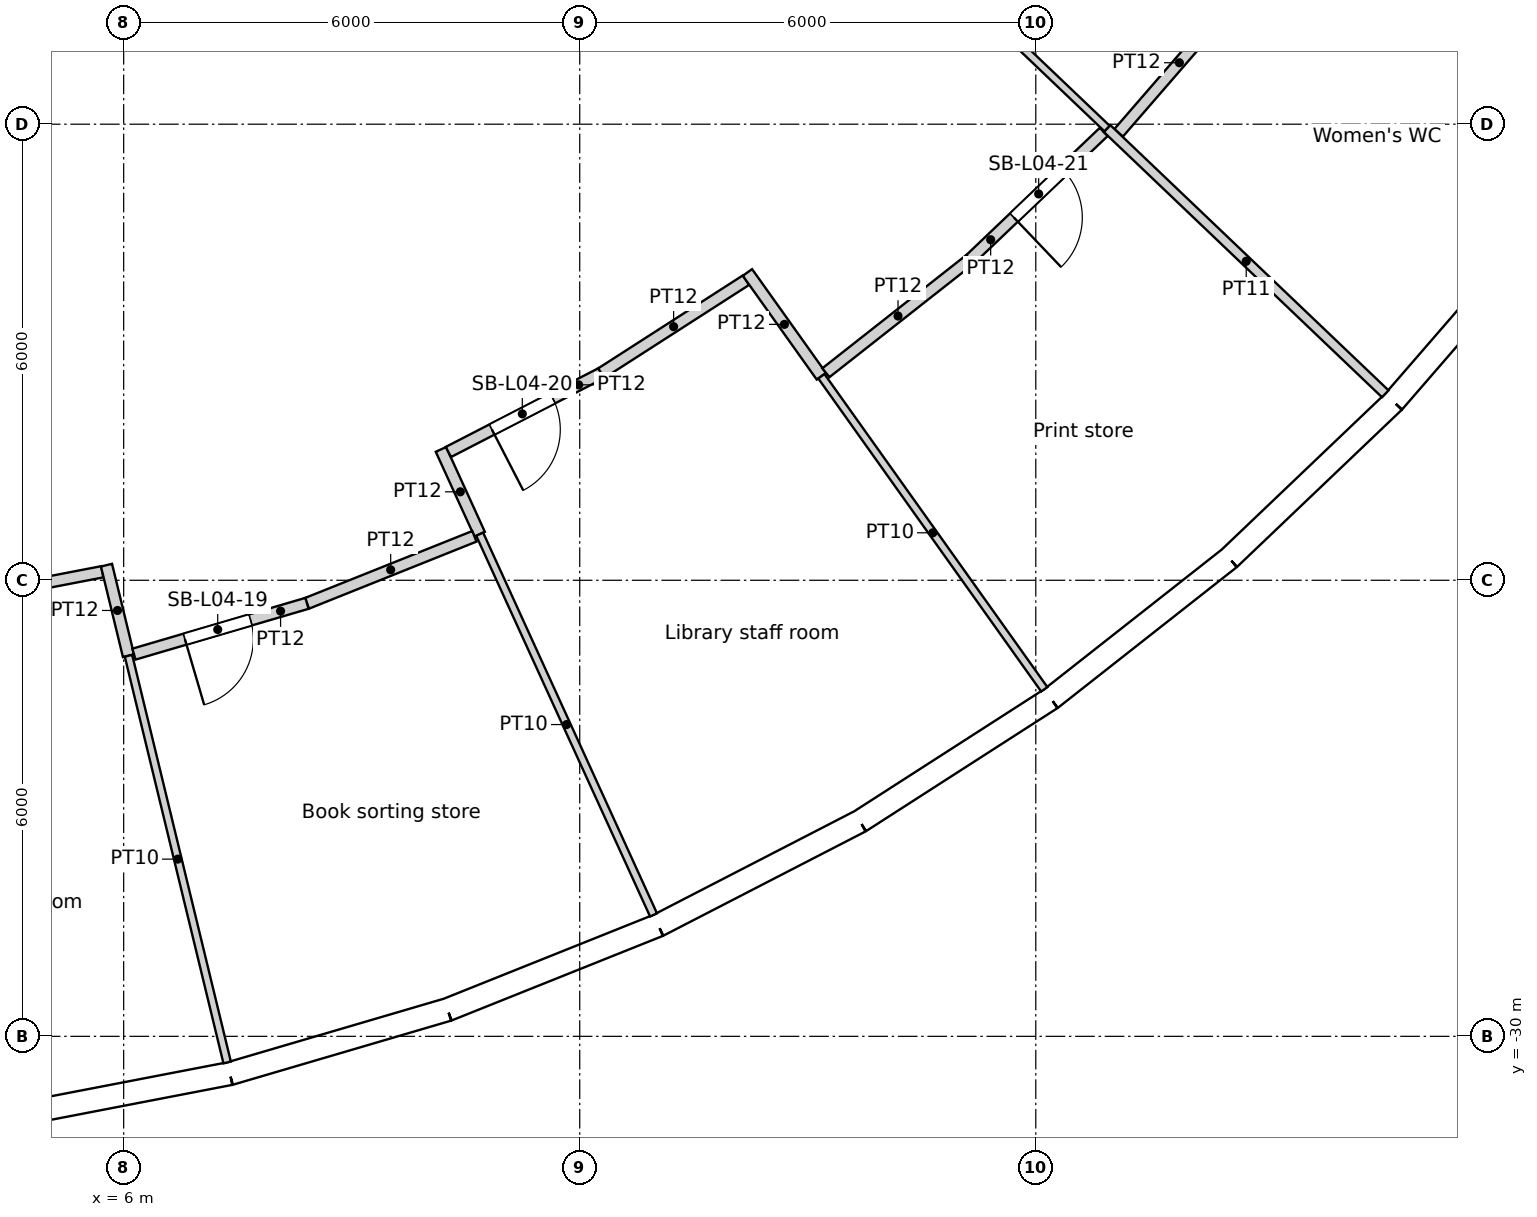
"""IFC4 building model, lengths in metres.
Left out: names, types, materials, properties, quantities, classifications, styles, units other than length and angle.
Written with IfcOpenShell. Run it as: python <this file> out.ifc"""

import sys

from ifc_helpers import new_model, si_unit, direction, frame, frame_2d, origin, origin_2d, place, context, subcontext, project, spatial, rectangle, circle, extrude, element, fill, save


model = new_model("IFC4")
c1 = context("Model", 3, precision=1e-05, world=origin(), true_north=direction((0.0, 1.0)))
c2 = subcontext(c1, "Body", "Model", "MODEL_VIEW")
j1 = project(units=[si_unit("LENGTHUNIT", "METRE"), si_unit("PLANEANGLEUNIT", "RADIAN")], contexts=[c1])
p1 = place(None, origin())
s1 = spatial("IfcSite", under=j1, at=p1, CompositionType="ELEMENT")
p2 = place(p1, origin())
s2 = spatial("IfcBuilding", under=s1, at=p2, CompositionType="ELEMENT")
p3 = place(p2, frame((0.0, 0.0, 23.4)))
s3 = spatial("IfcBuildingStorey", under=s2, at=p3, CompositionType="ELEMENT", Elevation=23.4)
for number, where, z_axis, x_axis in (
    (1, (7.137, -29.421, 0.0), (0.0, 0.0, 1.0), (1.0, 0.0, 0.0)),
    (2, (12.576, -27.539, 0.0), (0.0, 0.0, 1.0), (1.0, 0.0, 0.0)),
    (3, (17.561, -24.661, 0.0), (0.0, 0.0, 1.0), (1.0, 0.0, 0.0)),
    (4, (21.911, -20.892, 0.0), (0.0, 0.0, 1.0), (1.0, 0.0, 0.0)),
):
    element("IfcColumn", number, at=place(p3, frame(where, z_axis=z_axis, x_axis=x_axis)), inside=s3, PredefinedType="COLUMN", context=c2, shape_type="SweptSolid", body=[
        extrude(circle(Radius=0.7, at=origin_2d()), origin(), (0.0, 0.0, 1.0), 4.8),
    ])
for number, where, z_axis, x_axis in (
    (5, (9.723, -22.54, 0.0), (0.0, 0.0, 1.0), (1.0, 0.0, 0.0)),
    (6, (14.659, -19.69, 0.0), (0.0, 0.0, 1.0), (1.0, 0.0, 0.0)),
):
    element("IfcColumn", number, at=place(p3, frame(where, z_axis=z_axis, x_axis=x_axis)), inside=s3, PredefinedType="COLUMN", context=c2, shape_type="SweptSolid", body=[
        extrude(circle(Radius=0.75, at=origin_2d()), origin(), (0.0, 0.0, 1.0), 4.8),
    ])
p4 = place(p3, frame((6.876, -17.521, 0.0), z_axis=(0.0, 0.0, 1.0), x_axis=(1.0, 0.0, 0.0)))
e7 = element("IfcColumn", 7, at=p4, inside=s3, PredefinedType="COLUMN", context=c2, shape_type="SweptSolid", body=[
    extrude(circle(Radius=0.8, at=origin_2d()), origin(), (0.0, 0.0, 1.0), 4.8),
])
p5 = place(p3, frame((4.465, -31.055, 0.0), z_axis=(0.0, 0.0, 1.0), x_axis=(0.981918853666, 0.189302310646, 0.0)))
e8 = element("IfcWall", 8, at=p5, inside=s3, PredefinedType="SOLIDWALL", context=c2, shape_type="SweptSolid", body=[
    extrude(rectangle(XDim=2.986, YDim=0.3, at=frame_2d((1.493, 0.0))), origin(), (0.0, 0.0, 1.0), 3.85),
])
p6 = place(p5, frame((1.493, 0.0, 2.0)))
e9 = element("IfcOpeningElement", 9, at=p6, cuts=e8, PredefinedType="OPENING", context=c2, shape_type="SweptSolid", body=[
    extrude(circle(Radius=1.2, at=origin_2d()), frame((0.0, 0.16, 0.0), z_axis=(0.0, -1.0, 0.0), x_axis=(1.0, 0.0, 0.0)), (0.0, 0.0, 1.0), 0.32),
])
p7 = place(p3, frame((7.397, -30.49, 0.0), z_axis=(0.0, 0.0, 1.0), x_axis=(0.959502108153, 0.281701445593, 0.0)))
e10 = element("IfcWall", 10, at=p7, inside=s3, PredefinedType="SOLIDWALL", context=c2, shape_type="SweptSolid", body=[
    extrude(rectangle(XDim=2.986, YDim=0.3, at=frame_2d((1.493, 0.0))), origin(), (0.0, 0.0, 1.0), 4.35),
])
p8 = place(p7, frame((1.493, 0.0, 2.0)))
e11 = element("IfcOpeningElement", 11, at=p8, cuts=e10, PredefinedType="OPENING", context=c2, shape_type="SweptSolid", body=[
    extrude(circle(Radius=1.2, at=origin_2d()), frame((0.0, 0.16, 0.0), z_axis=(0.0, -1.0, 0.0), x_axis=(1.0, 0.0, 0.0)), (0.0, 0.0, 1.0), 0.32),
])
p9 = place(p3, frame((10.261, -29.649, 0.0), z_axis=(0.0, 0.0, 1.0), x_axis=(0.928380795373, 0.371630325434, 0.0)))
e12 = element("IfcWall", 12, at=p9, inside=s3, PredefinedType="SOLIDWALL", context=c2, shape_type="SweptSolid", body=[
    extrude(rectangle(XDim=2.986, YDim=0.3, at=frame_2d((1.493, 0.0))), origin(), (0.0, 0.0, 1.0), 4.35),
])
p10 = place(p9, frame((1.493, 0.0, 2.0)))
e13 = element("IfcOpeningElement", 13, at=p10, cuts=e12, PredefinedType="OPENING", context=c2, shape_type="SweptSolid", body=[
    extrude(circle(Radius=1.2, at=origin_2d()), frame((0.0, 0.16, 0.0), z_axis=(0.0, -1.0, 0.0), x_axis=(1.0, 0.0, 0.0)), (0.0, 0.0, 1.0), 0.32),
])
p11 = place(p3, frame((13.033, -28.539, 0.0), z_axis=(0.0, 0.0, 1.0), x_axis=(0.888831268481, 0.458234630043, 0.0)))
e14 = element("IfcWall", 14, at=p11, inside=s3, PredefinedType="SOLIDWALL", context=c2, shape_type="SweptSolid", body=[
    extrude(rectangle(XDim=2.986, YDim=0.3, at=frame_2d((1.493, 0.0))), origin(), (0.0, 0.0, 1.0), 3.85),
])
p12 = place(p11, frame((1.493, 0.0, 2.0)))
e15 = element("IfcOpeningElement", 15, at=p12, cuts=e14, PredefinedType="OPENING", context=c2, shape_type="SweptSolid", body=[
    extrude(circle(Radius=1.2, at=origin_2d()), frame((0.0, 0.16, 0.0), z_axis=(0.0, -1.0, 0.0), x_axis=(1.0, 0.0, 0.0)), (0.0, 0.0, 1.0), 0.32),
])
p13 = place(p3, frame((15.687, -27.171, 0.0), z_axis=(0.0, 0.0, 1.0), x_axis=(0.841242231846, 0.540658401727, 0.0)))
e16 = element("IfcWall", 16, at=p13, inside=s3, PredefinedType="SOLIDWALL", context=c2, shape_type="SweptSolid", body=[
    extrude(rectangle(XDim=2.986, YDim=0.3, at=frame_2d((1.493, 0.0))), origin(), (0.0, 0.0, 1.0), 4.35),
])
p14 = place(p13, frame((1.493, 0.0, 2.0)))
e17 = element("IfcOpeningElement", 17, at=p14, cuts=e16, PredefinedType="OPENING", context=c2, shape_type="SweptSolid", body=[
    extrude(circle(Radius=1.2, at=origin_2d()), frame((0.0, 0.16, 0.0), z_axis=(0.0, -1.0, 0.0), x_axis=(1.0, 0.0, 0.0)), (0.0, 0.0, 1.0), 0.32),
])
p15 = place(p3, frame((18.199, -25.557, 0.0), z_axis=(0.0, 0.0, 1.0), x_axis=(0.786043032847, 0.618171780747, 0.0)))
e18 = element("IfcWall", 18, at=p15, inside=s3, PredefinedType="SOLIDWALL", context=c2, shape_type="SweptSolid", body=[
    extrude(rectangle(XDim=2.986, YDim=0.3, at=frame_2d((1.493, 0.0))), origin(), (0.0, 0.0, 1.0), 4.35),
])
p16 = place(p15, frame((1.493, 0.0, 2.0)))
e19 = element("IfcOpeningElement", 19, at=p16, cuts=e18, PredefinedType="OPENING", context=c2, shape_type="SweptSolid", body=[
    extrude(circle(Radius=1.2, at=origin_2d()), frame((0.0, 0.16, 0.0), z_axis=(0.0, -1.0, 0.0), x_axis=(1.0, 0.0, 0.0)), (0.0, 0.0, 1.0), 0.32),
])
p17 = place(p3, frame((20.546, -23.711, 0.0), z_axis=(0.0, 0.0, 1.0), x_axis=(0.723750841228, 0.690061388444, 0.0)))
e20 = element("IfcWall", 20, at=p17, inside=s3, PredefinedType="SOLIDWALL", context=c2, shape_type="SweptSolid", body=[
    extrude(rectangle(XDim=2.986, YDim=0.3, at=frame_2d((1.493, 0.0))), origin(), (0.0, 0.0, 1.0), 3.85),
])
p18 = place(p17, frame((1.493, 0.0, 2.0)))
e21 = element("IfcOpeningElement", 21, at=p18, cuts=e20, PredefinedType="OPENING", context=c2, shape_type="SweptSolid", body=[
    extrude(circle(Radius=1.2, at=origin_2d()), frame((0.0, 0.16, 0.0), z_axis=(0.0, -1.0, 0.0), x_axis=(1.0, 0.0, 0.0)), (0.0, 0.0, 1.0), 0.32),
])
p19 = place(p3, frame((22.707, -21.651, 0.0), z_axis=(0.0, 0.0, 1.0), x_axis=(0.654809121128, 0.755794294029, 0.0)))
e22 = element("IfcWall", 22, at=p19, inside=s3, PredefinedType="SOLIDWALL", context=c2, shape_type="SweptSolid", body=[
    extrude(rectangle(XDim=2.986, YDim=0.3, at=frame_2d((1.493, 0.0))), origin(), (0.0, 0.0, 1.0), 4.35),
])
p20 = place(p19, frame((1.493, 0.0, 2.0)))
e23 = element("IfcOpeningElement", 23, at=p20, cuts=e22, PredefinedType="OPENING", context=c2, shape_type="SweptSolid", body=[
    extrude(circle(Radius=1.2, at=origin_2d()), frame((0.0, 0.16, 0.0), z_axis=(0.0, -1.0, 0.0), x_axis=(1.0, 0.0, 0.0)), (0.0, 0.0, 1.0), 0.32),
])
p21 = place(p3, frame((3.496, -24.317, 0.0), z_axis=(0.0, 0.0, 1.0), x_axis=(0.981934043808, 0.18922350174, 0.0)))
e24 = element("IfcWall", 24, at=p21, inside=s3, PredefinedType="PARTITIONING", context=c2, shape_type="SweptSolid", body=[
    extrude(rectangle(XDim=2.263, YDim=0.15, at=frame_2d((1.131, 0.0))), origin(), (0.0, 0.0, 1.0), 3.75),
])
p22 = place(p3, frame((6.063, -24.993, 0.0), z_axis=(0.0, 0.0, 1.0), x_axis=(-0.235691182892, 0.97182800243, 0.0)))
e25 = element("IfcWall", 25, at=p22, inside=s3, PredefinedType="PARTITIONING", context=c2, shape_type="SweptSolid", body=[
    extrude(rectangle(XDim=1.227, YDim=0.15, at=frame_2d((0.613, 0.0))), origin(), (0.0, 0.0, 1.0), 3.75),
])
p23 = place(p3, frame((8.412, -24.304, 0.0), z_axis=(0.0, 0.0, 1.0), x_axis=(-0.959514485928, -0.281659282281, 0.0)))
e26 = element("IfcWall", 26, at=p23, inside=s3, PredefinedType="PARTITIONING", context=c2, shape_type="SweptSolid", body=[
    extrude(rectangle(XDim=2.372, YDim=0.15, at=frame_2d((1.186, 0.0))), origin(), (0.0, 0.0, 1.0), 3.75),
])
p24 = place(p23, frame((0.774, 0.0, 0.0)))
e27 = element("IfcOpeningElement", 27, at=p24, cuts=e26, PredefinedType="OPENING", context=c2, shape_type="SweptSolid", body=[
    extrude(rectangle(XDim=0.9, YDim=2.1, at=frame_2d((0.45, 1.05))), frame((0.0, 0.075, 0.0), z_axis=(0.0, -1.0, 0.0), x_axis=(1.0, 0.0, 0.0)), (0.0, 0.0, 1.0), 0.15),
])
p25 = place(p3, frame((7.361, -30.344, 0.0), z_axis=(0.0, 0.0, 1.0), x_axis=(-0.235758656248, 0.971811636072, 0.0)))
e28 = element("IfcWall", 28, at=p25, inside=s3, PredefinedType="PARTITIONING", context=c2, shape_type="SweptSolid", body=[
    extrude(rectangle(XDim=5.506, YDim=0.1, at=frame_2d((2.753, 0.0))), origin(), (0.0, 0.0, 1.0), 3.75),
])
p26 = place(p3, frame((8.412, -24.304, 0.0), z_axis=(0.0, 0.0, 1.0), x_axis=(0.928348885918, 0.371710029479, 0.0)))
e29 = element("IfcWall", 29, at=p26, inside=s3, PredefinedType="PARTITIONING", context=c2, shape_type="SweptSolid", body=[
    extrude(rectangle(XDim=2.372, YDim=0.15, at=frame_2d((1.186, 0.0))), origin(), (0.0, 0.0, 1.0), 3.75),
])
p27 = place(p3, frame((12.283, -21.275, 0.0), z_axis=(0.0, 0.0, 1.0), x_axis=(-0.888834753306, -0.458227870514, 0.0)))
e30 = element("IfcWall", 30, at=p27, inside=s3, PredefinedType="PARTITIONING", context=c2, shape_type="SweptSolid", body=[
    extrude(rectangle(XDim=2.263, YDim=0.15, at=frame_2d((1.131, 0.0))), origin(), (0.0, 0.0, 1.0), 3.75),
])
p28 = place(p27, frame((0.719, 0.0, 0.0)))
e31 = element("IfcOpeningElement", 31, at=p28, cuts=e30, PredefinedType="OPENING", context=c2, shape_type="SweptSolid", body=[
    extrude(rectangle(XDim=0.9, YDim=2.1, at=frame_2d((0.45, 1.05))), frame((0.0, 0.075, 0.0), z_axis=(0.0, -1.0, 0.0), x_axis=(1.0, 0.0, 0.0)), (0.0, 0.0, 1.0), 0.15),
])
p29 = place(p3, frame((10.684, -23.394, 0.0), z_axis=(0.0, 0.0, 1.0), x_axis=(-0.415392653696, 0.909642206175, 0.0)))
e32 = element("IfcWall", 32, at=p29, inside=s3, PredefinedType="PARTITIONING", context=c2, shape_type="SweptSolid", body=[
    extrude(rectangle(XDim=1.226, YDim=0.15, at=frame_2d((0.613, 0.0))), origin(), (0.0, 0.0, 1.0), 3.75),
])
p30 = place(p3, frame((12.283, -21.275, 0.0), z_axis=(0.0, 0.0, 1.0), x_axis=(0.841245074687, 0.540653978358, 0.0)))
e33 = element("IfcWall", 33, at=p30, inside=s3, PredefinedType="PARTITIONING", context=c2, shape_type="SweptSolid", body=[
    extrude(rectangle(XDim=2.263, YDim=0.15, at=frame_2d((1.131, 0.0))), origin(), (0.0, 0.0, 1.0), 3.75),
])
p31 = place(p3, frame((12.971, -28.403, 0.0), z_axis=(0.0, 0.0, 1.0), x_axis=(-0.415402419846, 0.909637746351, 0.0)))
e34 = element("IfcWall", 34, at=p31, inside=s3, PredefinedType="PARTITIONING", context=c2, shape_type="SweptSolid", body=[
    extrude(rectangle(XDim=5.506, YDim=0.1, at=frame_2d((2.753, 0.0))), origin(), (0.0, 0.0, 1.0), 3.75),
])
p32 = place(p3, frame((15.179, -21.316, 0.0), z_axis=(0.0, 0.0, 1.0), x_axis=(-0.580039379053, 0.814588435191, 0.0)))
e35 = element("IfcWall", 35, at=p32, inside=s3, PredefinedType="PARTITIONING", context=c2, shape_type="SweptSolid", body=[
    extrude(rectangle(XDim=1.677, YDim=0.15, at=frame_2d((0.838, 0.0))), origin(), (0.0, 0.0, 1.0), 3.75),
])
p33 = place(p3, frame((15.238, -21.27, 0.0), z_axis=(0.0, 0.0, 1.0), x_axis=(0.786009575481, 0.618214321456, 0.0)))
e36 = element("IfcWall", 36, at=p33, inside=s3, PredefinedType="PARTITIONING", context=c2, shape_type="SweptSolid", body=[
    extrude(rectangle(XDim=2.415, YDim=0.15, at=frame_2d((1.208, 0.0))), origin(), (0.0, 0.0, 1.0), 3.75),
])
p34 = place(p3, frame((18.894, -18.102, 0.0), z_axis=(0.0, 0.0, 1.0), x_axis=(-0.723750392948, -0.690061858609, 0.0)))
e37 = element("IfcWall", 37, at=p34, inside=s3, PredefinedType="PARTITIONING", context=c2, shape_type="SweptSolid", body=[
    extrude(rectangle(XDim=2.428, YDim=0.15, at=frame_2d((1.214, 0.0))), origin(), (0.0, 0.0, 1.0), 3.75),
])
p35 = place(p34, frame((0.733, 0.0, 0.0)))
e38 = element("IfcOpeningElement", 38, at=p35, cuts=e37, PredefinedType="OPENING", context=c2, shape_type="SweptSolid", body=[
    extrude(rectangle(XDim=0.9, YDim=2.1, at=frame_2d((0.45, 1.05))), frame((0.0, 0.075, 0.0), z_axis=(0.0, -1.0, 0.0), x_axis=(1.0, 0.0, 0.0)), (0.0, 0.0, 1.0), 0.15),
])
p36 = place(p3, frame((18.112, -25.435, 0.0), z_axis=(0.0, 0.0, 1.0), x_axis=(-0.580068174904, 0.814567929926, 0.0)))
e39 = element("IfcWall", 39, at=p36, inside=s3, PredefinedType="PARTITIONING", context=c2, shape_type="SweptSolid", body=[
    extrude(rectangle(XDim=5.056, YDim=0.1, at=frame_2d((2.528, 0.0))), origin(), (0.0, 0.0, 1.0), 3.75),
])
p37 = place(p3, frame((18.939, -18.058, 0.0), z_axis=(0.0, 0.0, 1.0), x_axis=(-0.723743423805, 0.690069167909, 0.0)))
e40 = element("IfcWall", 40, at=p37, inside=s3, PredefinedType="PARTITIONING", context=c2, shape_type="SweptSolid", body=[
    extrude(rectangle(XDim=8.2, YDim=0.1, at=frame_2d((4.1, 0.0))), origin(), (0.0, 0.0, 1.0), 3.75),
])
p38 = place(p3, frame((19.09, -18.113, 0.0), z_axis=(0.0, 0.0, 1.0), x_axis=(0.654884832062, 0.755728692545, 0.0)))
e41 = element("IfcWall", 41, at=p38, inside=s3, PredefinedType="PARTITIONING", context=c2, shape_type="SweptSolid", body=[
    extrude(rectangle(XDim=2.44, YDim=0.15, at=frame_2d((1.22, 0.0))), origin(), (0.0, 0.0, 1.0), 3.75),
])
p39 = place(p3, frame((22.598, -21.547, 0.0), z_axis=(0.0, 0.0, 1.0), x_axis=(-0.723735862307, 0.690077098309, 0.0)))
e42 = element("IfcWall", 42, at=p39, inside=s3, PredefinedType="PARTITIONING", context=c2, shape_type="SweptSolid", body=[
    extrude(rectangle(XDim=5.056, YDim=0.125, at=frame_2d((2.528, 0.0))), origin(), (0.0, 0.0, 1.0), 3.75),
])
p40 = place(p6, origin())
e43 = element("IfcWindow", 43, at=p40, inside=s3, PartitioningType="SINGLE_PANEL", PredefinedType="WINDOW", context=c2, shape_type="SweptSolid", body=[
    extrude(circle(Radius=1.2, at=origin_2d()), frame((0.0, 0.12, 0.0), z_axis=(0.0, -1.0, 0.0), x_axis=(1.0, 0.0, 0.0)), (0.0, 0.0, 1.0), 0.1),
])
fill(e9, e43)
p41 = place(p8, origin())
e44 = element("IfcWindow", 44, at=p41, inside=s3, PartitioningType="SINGLE_PANEL", PredefinedType="WINDOW", context=c2, shape_type="SweptSolid", body=[
    extrude(circle(Radius=1.2, at=origin_2d()), frame((0.0, 0.12, 0.0), z_axis=(0.0, -1.0, 0.0), x_axis=(1.0, 0.0, 0.0)), (0.0, 0.0, 1.0), 0.1),
])
fill(e11, e44)
p42 = place(p10, origin())
e45 = element("IfcWindow", 45, at=p42, inside=s3, PartitioningType="SINGLE_PANEL", PredefinedType="WINDOW", context=c2, shape_type="SweptSolid", body=[
    extrude(circle(Radius=1.2, at=origin_2d()), frame((0.0, 0.12, 0.0), z_axis=(0.0, -1.0, 0.0), x_axis=(1.0, 0.0, 0.0)), (0.0, 0.0, 1.0), 0.1),
])
fill(e13, e45)
p43 = place(p12, origin())
e46 = element("IfcWindow", 46, at=p43, inside=s3, PartitioningType="SINGLE_PANEL", PredefinedType="WINDOW", context=c2, shape_type="SweptSolid", body=[
    extrude(circle(Radius=1.2, at=origin_2d()), frame((0.0, 0.12, 0.0), z_axis=(0.0, -1.0, 0.0), x_axis=(1.0, 0.0, 0.0)), (0.0, 0.0, 1.0), 0.1),
])
fill(e15, e46)
p44 = place(p14, origin())
e47 = element("IfcWindow", 47, at=p44, inside=s3, PartitioningType="SINGLE_PANEL", PredefinedType="WINDOW", context=c2, shape_type="SweptSolid", body=[
    extrude(circle(Radius=1.2, at=origin_2d()), frame((0.0, 0.12, 0.0), z_axis=(0.0, -1.0, 0.0), x_axis=(1.0, 0.0, 0.0)), (0.0, 0.0, 1.0), 0.1),
])
fill(e17, e47)
p45 = place(p16, origin())
e48 = element("IfcWindow", 48, at=p45, inside=s3, PartitioningType="SINGLE_PANEL", PredefinedType="WINDOW", context=c2, shape_type="SweptSolid", body=[
    extrude(circle(Radius=1.2, at=origin_2d()), frame((0.0, 0.12, 0.0), z_axis=(0.0, -1.0, 0.0), x_axis=(1.0, 0.0, 0.0)), (0.0, 0.0, 1.0), 0.1),
])
fill(e19, e48)
p46 = place(p18, origin())
e49 = element("IfcWindow", 49, at=p46, inside=s3, PartitioningType="SINGLE_PANEL", PredefinedType="WINDOW", context=c2, shape_type="SweptSolid", body=[
    extrude(circle(Radius=1.2, at=origin_2d()), frame((0.0, 0.12, 0.0), z_axis=(0.0, -1.0, 0.0), x_axis=(1.0, 0.0, 0.0)), (0.0, 0.0, 1.0), 0.1),
])
fill(e21, e49)
p47 = place(p20, origin())
e50 = element("IfcWindow", 50, at=p47, inside=s3, PartitioningType="SINGLE_PANEL", PredefinedType="WINDOW", context=c2, shape_type="SweptSolid", body=[
    extrude(circle(Radius=1.2, at=origin_2d()), frame((0.0, 0.12, 0.0), z_axis=(0.0, -1.0, 0.0), x_axis=(1.0, 0.0, 0.0)), (0.0, 0.0, 1.0), 0.1),
])
fill(e23, e50)
p48 = place(p24, origin())
e51 = element("IfcDoor", 51, at=p48, inside=s3, OperationType="SINGLE_SWING_RIGHT", PredefinedType="DOOR", context=c2, shape_type="SweptSolid", body=[
    extrude(rectangle(XDim=0.9, YDim=2.1, at=frame_2d((0.45, 1.05))), frame((0.0, 0.025, 0.0), z_axis=(0.0, -1.0, 0.0), x_axis=(1.0, 0.0, 0.0)), (0.0, 0.0, 1.0), 0.05),
])
fill(e27, e51)
p49 = place(p28, origin())
e52 = element("IfcDoor", 52, at=p49, inside=s3, OperationType="SINGLE_SWING_RIGHT", PredefinedType="DOOR", context=c2, shape_type="SweptSolid", body=[
    extrude(rectangle(XDim=0.9, YDim=2.1, at=frame_2d((0.45, 1.05))), frame((0.0, 0.025, 0.0), z_axis=(0.0, -1.0, 0.0), x_axis=(1.0, 0.0, 0.0)), (0.0, 0.0, 1.0), 0.05),
])
fill(e31, e52)
p50 = place(p35, origin())
e53 = element("IfcDoor", 53, at=p50, inside=s3, OperationType="SINGLE_SWING_RIGHT", PredefinedType="DOOR", context=c2, shape_type="SweptSolid", body=[
    extrude(rectangle(XDim=0.9, YDim=2.1, at=frame_2d((0.45, 1.05))), frame((0.0, 0.025, 0.0), z_axis=(0.0, -1.0, 0.0), x_axis=(1.0, 0.0, 0.0)), (0.0, 0.0, 1.0), 0.05),
])
fill(e38, e53)
save(model, sys.argv[1])
